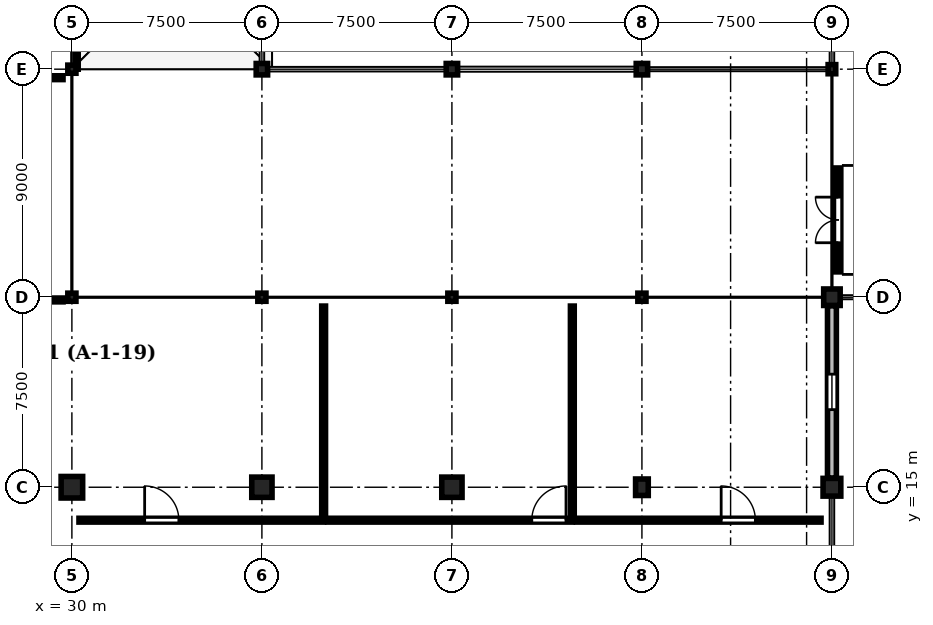
"""IFC4 building model, lengths in metres.
Left out: names, types, materials, properties, quantities, classifications, styles, units other than length and angle.
Written with IfcOpenShell. Run it as: python <this file> out.ifc"""

import sys

from ifc_helpers import new_model, si_unit, direction, frame, frame_2d, origin, origin_2d, place, context, subcontext, project, spatial, rectangle, i_section, extrude, element, fill, save


model = new_model("IFC4")
c1 = context("Model", 3, precision=1e-05, world=origin(), true_north=direction((0.0, 1.0)))
c2 = subcontext(c1, "Body", "Model", "MODEL_VIEW")
j1 = project(units=[si_unit("LENGTHUNIT", "METRE"), si_unit("PLANEANGLEUNIT", "RADIAN")], contexts=[c1])
p1 = place(None, origin())
s1 = spatial("IfcSite", under=j1, at=p1, CompositionType="ELEMENT")
p2 = place(p1, origin())
s2 = spatial("IfcBuilding", under=s1, at=p2, CompositionType="ELEMENT")
p3 = place(p2, frame((0.0, 0.0, 4.8)))
s3 = spatial("IfcBuildingStorey", under=s2, at=p3, CompositionType="ELEMENT", Elevation=4.8)
p4 = place(p3, frame((30.0, 15.0, 0.0), z_axis=(0.0, 0.0, 1.0), x_axis=(1.0, 0.0, 0.0)))
e1 = element("IfcColumn", 1, at=p4, inside=s3, PredefinedType="COLUMN", context=c2, shape_type="SweptSolid", body=[
    extrude(rectangle(XDim=0.85, YDim=0.85, at=origin_2d()), origin(), (0.0, 0.0, 1.0), 4.5),
])
for number, where, z_axis, x_axis in (
    (2, (30.0, 22.5, 0.0), (0.0, 0.0, 1.0), (1.0, 0.0, 0.0)),
    (3, (30.0, 31.5, 0.0), (0.0, 0.0, 1.0), (1.0, 0.0, 0.0)),
):
    element("IfcColumn", number, at=place(p3, frame(where, z_axis=z_axis, x_axis=x_axis)), inside=s3, PredefinedType="COLUMN", context=c2, shape_type="SweptSolid", body=[
        extrude(rectangle(XDim=0.32, YDim=0.32, at=origin_2d()), origin(), (0.0, 0.0, 1.0), 4.5),
    ])
p5 = place(p3, frame((37.5, 15.0, 0.0), z_axis=(0.0, 0.0, 1.0), x_axis=(1.0, 0.0, 0.0)))
e4 = element("IfcColumn", 4, at=p5, inside=s3, PredefinedType="COLUMN", context=c2, shape_type="SweptSolid", body=[
    extrude(rectangle(XDim=0.8, YDim=0.8, at=origin_2d()), origin(), (0.0, 0.0, 1.0), 4.5),
])
p6 = place(p3, frame((37.5, 22.5, 0.0), z_axis=(0.0, 0.0, 1.0), x_axis=(1.0, 0.0, 0.0)))
e5 = element("IfcColumn", 5, at=p6, inside=s3, PredefinedType="COLUMN", context=c2, shape_type="SweptSolid", body=[
    extrude(rectangle(XDim=0.32, YDim=0.32, at=origin_2d()), origin(), (0.0, 0.0, 1.0), 4.5),
])
p7 = place(p3, frame((37.5, 31.5, 0.0), z_axis=(0.0, 0.0, 1.0), x_axis=(1.0, 0.0, 0.0)))
e6 = element("IfcColumn", 6, at=p7, inside=s3, PredefinedType="COLUMN", context=c2, shape_type="SweptSolid", body=[
    extrude(rectangle(XDim=0.45, YDim=0.45, at=origin_2d()), origin(), (0.0, 0.0, 1.0), 4.5),
])
p8 = place(p3, frame((45.0, 15.0, 0.0), z_axis=(0.0, 0.0, 1.0), x_axis=(1.0, 0.0, 0.0)))
e7 = element("IfcColumn", 7, at=p8, inside=s3, PredefinedType="COLUMN", context=c2, shape_type="SweptSolid", body=[
    extrude(rectangle(XDim=0.8, YDim=0.8, at=origin_2d()), origin(), (0.0, 0.0, 1.0), 4.5),
])
p9 = place(p3, frame((45.0, 22.5, 0.0), z_axis=(0.0, 0.0, 1.0), x_axis=(1.0, 0.0, 0.0)))
e8 = element("IfcColumn", 8, at=p9, inside=s3, PredefinedType="COLUMN", context=c2, shape_type="SweptSolid", body=[
    extrude(rectangle(XDim=0.32, YDim=0.32, at=origin_2d()), origin(), (0.0, 0.0, 1.0), 4.5),
])
p10 = place(p3, frame((45.0, 31.5, 0.0), z_axis=(0.0, 0.0, 1.0), x_axis=(1.0, 0.0, 0.0)))
e9 = element("IfcColumn", 9, at=p10, inside=s3, PredefinedType="COLUMN", context=c2, shape_type="SweptSolid", body=[
    extrude(rectangle(XDim=0.45, YDim=0.45, at=origin_2d()), origin(), (0.0, 0.0, 1.0), 4.5),
])
p11 = place(p3, frame((52.5, 15.0, 0.0), z_axis=(0.0, 0.0, 1.0), x_axis=(1.0, 0.0, 0.0)))
e10 = element("IfcColumn", 10, at=p11, inside=s3, PredefinedType="COLUMN", context=c2, shape_type="SweptSolid", body=[
    extrude(rectangle(XDim=0.5, YDim=0.65, at=origin_2d()), origin(), (0.0, 0.0, 1.0), 4.5),
])
p12 = place(p3, frame((52.5, 22.5, 0.0), z_axis=(0.0, 0.0, 1.0), x_axis=(1.0, 0.0, 0.0)))
e11 = element("IfcColumn", 11, at=p12, inside=s3, PredefinedType="COLUMN", context=c2, shape_type="SweptSolid", body=[
    extrude(rectangle(XDim=0.32, YDim=0.32, at=origin_2d()), origin(), (0.0, 0.0, 1.0), 4.5),
])
p13 = place(p3, frame((52.5, 31.5, 0.0), z_axis=(0.0, 0.0, 1.0), x_axis=(1.0, 0.0, 0.0)))
e12 = element("IfcColumn", 12, at=p13, inside=s3, PredefinedType="COLUMN", context=c2, shape_type="SweptSolid", body=[
    extrude(rectangle(XDim=0.45, YDim=0.45, at=origin_2d()), origin(), (0.0, 0.0, 1.0), 4.5),
])
p14 = place(p3, frame((60.0, 15.0, 0.0), z_axis=(0.0, 0.0, 1.0), x_axis=(1.0, 0.0, 0.0)))
e13 = element("IfcColumn", 13, at=p14, inside=s3, PredefinedType="COLUMN", context=c2, shape_type="SweptSolid", body=[
    extrude(rectangle(XDim=0.7, YDim=0.7, at=origin_2d()), origin(), (0.0, 0.0, 1.0), 4.5),
])
p15 = place(p3, frame((60.0, 22.5, 0.0), z_axis=(0.0, 0.0, 1.0), x_axis=(1.0, 0.0, 0.0)))
e14 = element("IfcColumn", 14, at=p15, inside=s3, PredefinedType="COLUMN", context=c2, shape_type="SweptSolid", body=[
    extrude(rectangle(XDim=0.65, YDim=0.65, at=origin_2d()), origin(), (0.0, 0.0, 1.0), 4.5),
])
p16 = place(p3, frame((60.0, 31.5, 0.0), z_axis=(0.0, 0.0, 1.0), x_axis=(1.0, 0.0, 0.0)))
e15 = element("IfcColumn", 15, at=p16, inside=s3, PredefinedType="COLUMN", context=c2, shape_type="SweptSolid", body=[
    extrude(i_section(OverallWidth=0.3, OverallDepth=0.36, WebThickness=0.012, FlangeThickness=0.022, FilletRadius=0.027, at=origin_2d()), origin(), (0.0, 0.0, 1.0), 4.5),
])
p17 = place(p3, frame((60.0, 22.165, 0.0), z_axis=(0.0, 0.0, 1.0), x_axis=(0.0, -1.0, 0.0)))
e16 = element("IfcWall", 16, at=p17, inside=s3, PredefinedType="STANDARD", context=c2, shape_type="SweptSolid", body=[
    extrude(rectangle(XDim=6.805, YDim=0.35, at=frame_2d((3.402, 0.0))), origin(), (0.0, 0.0, 1.0), 3.63),
])
p18 = place(p17, frame((2.702, 0.0, 0.9)))
e17 = element("IfcOpeningElement", 17, at=p18, cuts=e16, PredefinedType="OPENING", context=c2, shape_type="SweptSolid", body=[
    extrude(rectangle(XDim=1.4, YDim=1.8, at=frame_2d((0.7, 0.9))), frame((0.0, 0.185, 0.0), z_axis=(0.0, -1.0, 0.0), x_axis=(1.0, 0.0, 0.0)), (0.0, 0.0, 1.0), 0.37),
])
p19 = place(p3, frame((60.25, 23.5, 0.0), z_axis=(0.0, 0.0, 1.0), x_axis=(0.0, 1.0, 0.0)))
e18 = element("IfcWall", 18, at=p19, inside=s3, PredefinedType="STANDARD", context=c2, shape_type="SweptSolid", body=[
    extrude(rectangle(XDim=4.1, YDim=0.2, at=frame_2d((2.05, 0.0))), origin(), (0.0, 0.0, 1.0), 3.465),
])
p20 = place(p19, frame((1.15, 0.0, 0.0)))
e19 = element("IfcOpeningElement", 19, at=p20, cuts=e18, PredefinedType="OPENING", context=c2, shape_type="SweptSolid", body=[
    extrude(rectangle(XDim=1.8, YDim=2.25, at=frame_2d((0.9, 1.125))), frame((0.0, 0.11, 0.0), z_axis=(0.0, -1.0, 0.0), x_axis=(1.0, 0.0, 0.0)), (0.0, 0.0, 1.0), 0.22),
])
p21 = place(p3, frame((30.28, 13.7, 0.0), z_axis=(0.0, 0.0, 1.0), x_axis=(1.0, 0.0, 0.0)))
e20 = element("IfcWall", 20, at=p21, inside=s3, PredefinedType="PARTITIONING", context=c2, shape_type="SweptSolid", body=[
    extrude(rectangle(XDim=9.657, YDim=0.15, at=frame_2d((4.828, 0.0))), origin(), (0.0, 0.0, 1.0), 4.165),
])
p22 = place(p21, frame((2.592, 0.0, 0.0)))
e21 = element("IfcOpeningElement", 21, at=p22, cuts=e20, PredefinedType="OPENING", context=c2, shape_type="SweptSolid", body=[
    extrude(rectangle(XDim=1.35, YDim=2.25, at=frame_2d((0.675, 1.125))), frame((0.0, 0.085, 0.0), z_axis=(0.0, -1.0, 0.0), x_axis=(1.0, 0.0, 0.0)), (0.0, 0.0, 1.0), 0.17),
])
p23 = place(p3, frame((40.097, 13.7, 0.0), z_axis=(0.0, 0.0, 1.0), x_axis=(1.0, 0.0, 0.0)))
e22 = element("IfcWall", 22, at=p23, inside=s3, PredefinedType="PARTITIONING", context=c2, shape_type="SweptSolid", body=[
    extrude(rectangle(XDim=9.657, YDim=0.15, at=frame_2d((4.828, 0.0))), origin(), (0.0, 0.0, 1.0), 4.165),
])
p24 = place(p23, frame((8.057, 0.0, 0.0)))
e23 = element("IfcOpeningElement", 23, at=p24, cuts=e22, PredefinedType="OPENING", context=c2, shape_type="SweptSolid", body=[
    extrude(rectangle(XDim=1.35, YDim=2.25, at=frame_2d((0.675, 1.125))), frame((0.0, 0.085, 0.0), z_axis=(0.0, -1.0, 0.0), x_axis=(1.0, 0.0, 0.0)), (0.0, 0.0, 1.0), 0.17),
])
p25 = place(p3, frame((49.913, 13.7, 0.0), z_axis=(0.0, 0.0, 1.0), x_axis=(1.0, 0.0, 0.0)))
e24 = element("IfcWall", 24, at=p25, inside=s3, PredefinedType="PARTITIONING", context=c2, shape_type="SweptSolid", body=[
    extrude(rectangle(XDim=9.657, YDim=0.15, at=frame_2d((4.828, 0.0))), origin(), (0.0, 0.0, 1.0), 4.165),
])
p26 = place(p25, frame((5.715, 0.0, 0.0)))
e25 = element("IfcOpeningElement", 25, at=p26, cuts=e24, PredefinedType="OPENING", context=c2, shape_type="SweptSolid", body=[
    extrude(rectangle(XDim=1.35, YDim=2.25, at=frame_2d((0.675, 1.125))), frame((0.0, 0.085, 0.0), z_axis=(0.0, -1.0, 0.0), x_axis=(1.0, 0.0, 0.0)), (0.0, 0.0, 1.0), 0.17),
])
p27 = place(p3, frame((30.2, 76.15, 0.0), z_axis=(0.0, 0.0, 1.0), x_axis=(0.0, -1.0, 0.0)))
e26 = element("IfcWall", 26, at=p27, inside=s3, PredefinedType="PARTITIONING", context=c2, shape_type="SweptSolid", body=[
    extrude(rectangle(XDim=44.65, YDim=0.1, at=frame_2d((22.325, 0.0))), origin(), (0.0, 0.0, 1.0), 3.615),
])
p28 = place(p27, frame((17.49, 0.0, 0.0)))
e27 = element("IfcOpeningElement", 27, at=p28, cuts=e26, PredefinedType="OPENING", context=c2, shape_type="SweptSolid", body=[
    extrude(rectangle(XDim=1.05, YDim=2.2, at=frame_2d((0.525, 1.1))), frame((0.0, 0.06, 0.0), z_axis=(0.0, -1.0, 0.0), x_axis=(1.0, 0.0, 0.0)), (0.0, 0.0, 1.0), 0.12),
])
for number, where, z_axis, x_axis in (
    (28, (18.45, 22.392, 0.0), (0.0, 0.0, 1.0), (1.0, 0.0, 0.0)),
    (29, (18.45, 31.164, 0.0), (0.0, 0.0, 1.0), (1.0, 0.0, 0.0)),
):
    element("IfcWall", number, at=place(p3, frame(where, z_axis=z_axis, x_axis=x_axis)), inside=s3, PredefinedType="PARTITIONING", context=c2, shape_type="SweptSolid", body=[
        extrude(rectangle(XDim=11.2, YDim=0.15, at=frame_2d((5.6, 0.0))), origin(), (0.0, 0.0, 1.0), 3.515),
    ])
for number, where, z_axis, x_axis in (
    (30, (39.937, 13.7, 0.0), (0.0, 0.0, 1.0), (0.0, 1.0, 0.0)),
    (31, (49.753, 13.7, 0.0), (0.0, 0.0, 1.0), (0.0, 1.0, 0.0)),
):
    element("IfcWall", number, at=place(p3, frame(where, z_axis=z_axis, x_axis=x_axis)), inside=s3, PredefinedType="PARTITIONING", context=c2, shape_type="SweptSolid", body=[
        extrude(rectangle(XDim=8.45, YDim=0.15, at=frame_2d((4.225, 0.0))), origin(), (0.0, 0.0, 1.0), 4.165),
    ])
p29 = place(p18, origin())
e32 = element("IfcWindow", 32, at=p29, inside=s3, PartitioningType="SINGLE_PANEL", PredefinedType="WINDOW", context=c2, shape_type="SweptSolid", body=[
    extrude(rectangle(XDim=1.4, YDim=1.8, at=frame_2d((0.7, 0.9))), frame((0.0, 0.03, 0.0), z_axis=(0.0, -1.0, 0.0), x_axis=(1.0, 0.0, 0.0)), (0.0, 0.0, 1.0), 0.06),
])
fill(e17, e32)
p30 = place(p20, origin())
e33 = element("IfcDoor", 33, at=p30, inside=s3, OperationType="DOUBLE_DOOR_SINGLE_SWING", PredefinedType="DOOR", context=c2, shape_type="SweptSolid", body=[
    extrude(rectangle(XDim=1.8, YDim=2.25, at=frame_2d((0.9, 1.125))), frame((0.0, 0.025, 0.0), z_axis=(0.0, -1.0, 0.0), x_axis=(1.0, 0.0, 0.0)), (0.0, 0.0, 1.0), 0.05),
])
fill(e19, e33)
p31 = place(p22, origin())
e34 = element("IfcDoor", 34, at=p31, inside=s3, OperationType="SINGLE_SWING_LEFT", PredefinedType="DOOR", context=c2, shape_type="SweptSolid", body=[
    extrude(rectangle(XDim=1.35, YDim=2.25, at=frame_2d((0.675, 1.125))), frame((0.0, 0.025, 0.0), z_axis=(0.0, -1.0, 0.0), x_axis=(1.0, 0.0, 0.0)), (0.0, 0.0, 1.0), 0.05),
])
fill(e21, e34)
p32 = place(p24, origin())
e35 = element("IfcDoor", 35, at=p32, inside=s3, OperationType="SINGLE_SWING_RIGHT", PredefinedType="DOOR", context=c2, shape_type="SweptSolid", body=[
    extrude(rectangle(XDim=1.35, YDim=2.25, at=frame_2d((0.675, 1.125))), frame((0.0, 0.025, 0.0), z_axis=(0.0, -1.0, 0.0), x_axis=(1.0, 0.0, 0.0)), (0.0, 0.0, 1.0), 0.05),
])
fill(e23, e35)
p33 = place(p26, origin())
e36 = element("IfcDoor", 36, at=p33, inside=s3, OperationType="SINGLE_SWING_LEFT", PredefinedType="DOOR", context=c2, shape_type="SweptSolid", body=[
    extrude(rectangle(XDim=1.35, YDim=2.25, at=frame_2d((0.675, 1.125))), frame((0.0, 0.025, 0.0), z_axis=(0.0, -1.0, 0.0), x_axis=(1.0, 0.0, 0.0)), (0.0, 0.0, 1.0), 0.05),
])
fill(e25, e36)
save(model, sys.argv[1])
